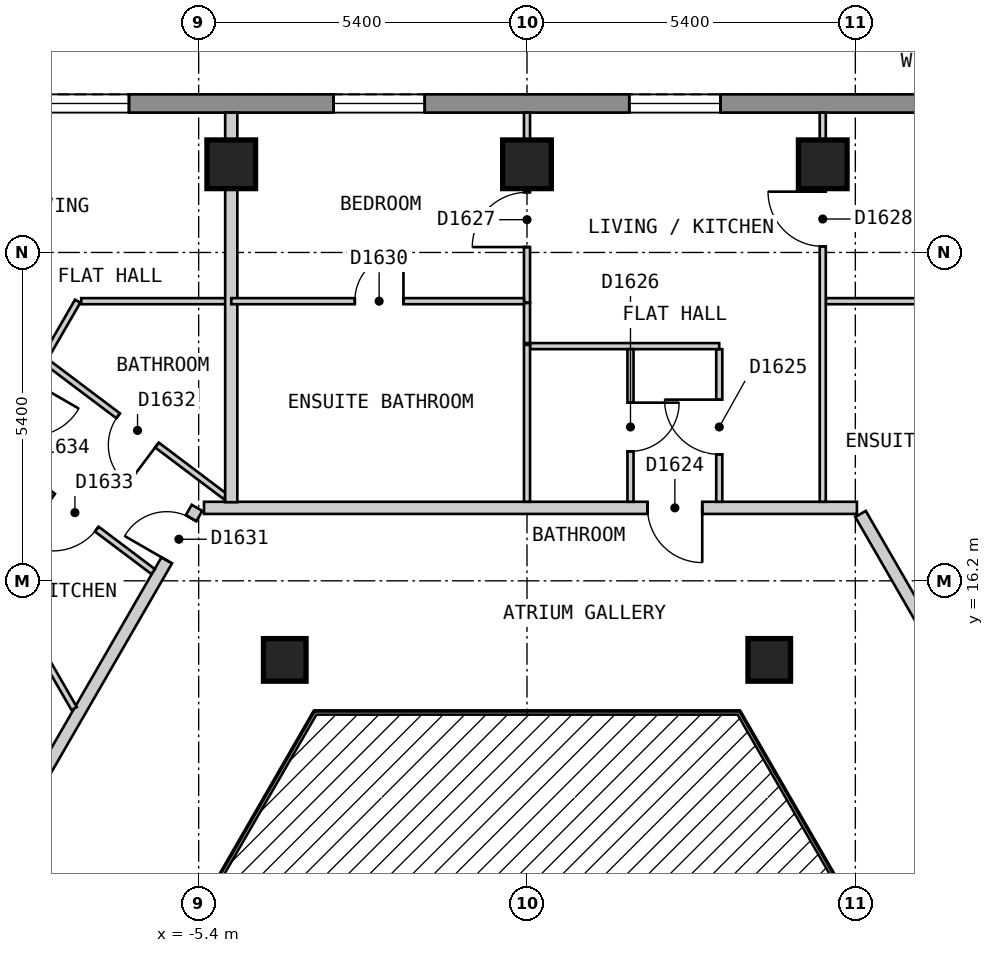
"""IFC4 building model, lengths in metres.
Left out: names, types, materials, properties, quantities, classifications, styles, units other than length and angle.
Written with IfcOpenShell. Run it as: python <this file> out.ifc"""

import sys

from ifc_helpers import new_model, si_unit, direction, frame, frame_2d, origin, origin_2d, place, context, subcontext, project, spatial, polyline, rectangle, outline, extrude, element, fill, save


model = new_model("IFC4")
c1 = context("Model", 3, precision=1e-05, world=origin(), true_north=direction((0.0, 1.0)))
c2 = subcontext(c1, "Body", "Model", "MODEL_VIEW")
j1 = project(units=[si_unit("LENGTHUNIT", "METRE"), si_unit("PLANEANGLEUNIT", "RADIAN")], contexts=[c1])
p1 = place(None, origin())
s1 = spatial("IfcSite", under=j1, at=p1, CompositionType="ELEMENT")
p2 = place(p1, origin())
s2 = spatial("IfcBuilding", under=s1, at=p2, CompositionType="ELEMENT")
p3 = place(p2, frame((0.0, 0.0, 163.2)))
s3 = spatial("IfcBuildingStorey", under=s2, at=p3, CompositionType="ELEMENT", Elevation=163.2)
for number, where, z_axis, x_axis in (
    (1, (4.864, 23.05, 0.0), (0.0, 0.0, 1.0), (-1.0, 0.0, 0.0)),
    (2, (0.0, 23.05, 0.0), (0.0, 0.0, 1.0), (-1.0, 0.0, 0.0)),
    (3, (-4.864, 23.05, 0.0), (0.0, 0.0, 1.0), (-1.0, 0.0, 0.0)),
):
    element("IfcColumn", number, at=place(p3, frame(where, z_axis=z_axis, x_axis=x_axis)), inside=s3, PredefinedType="COLUMN", context=c2, shape_type="SweptSolid", body=[
        extrude(rectangle(XDim=0.8, YDim=0.8, at=origin_2d()), origin(), (0.0, 0.0, 1.0), 3.0),
    ])
for number, where, z_axis, x_axis in (
    (4, (3.984, 14.9, 0.0), (0.0, 0.0, 1.0), (1.0, 0.0, 0.0)),
    (5, (-3.984, 14.9, 0.0), (0.0, 0.0, 1.0), (1.0, 0.0, 0.0)),
):
    element("IfcColumn", number, at=place(p3, frame(where, z_axis=z_axis, x_axis=x_axis)), inside=s3, PredefinedType="COLUMN", context=c2, shape_type="SweptSolid", body=[
        extrude(rectangle(XDim=0.7, YDim=0.7, at=origin_2d()), origin(), (0.0, 0.0, 1.0), 3.0),
    ])
p4 = place(p3, frame((10.392, 24.05, 0.0), z_axis=(0.0, 0.0, 1.0), x_axis=(-1.0, 0.0, 0.0)))
e6 = element("IfcWall", 6, at=p4, inside=s3, PredefinedType="SOLIDWALL", context=c2, shape_type="SweptSolid", body=[
    extrude(outline(polyline([(0.0, -0.15), (20.784, -0.15), (20.704, 0.15), (0.08, 0.15), (0.0, -0.15)])), origin(), (0.0, 0.0, 1.0), 2.7),
])
p5 = place(p4, frame((2.346, 0.0, 0.15)))
e7 = element("IfcOpeningElement", 7, at=p5, cuts=e6, PredefinedType="OPENING", context=c2, shape_type="SweptSolid", body=[
    extrude(rectangle(XDim=1.5, YDim=2.1, at=frame_2d((0.75, 1.05))), frame((0.0, 0.16, 0.0), z_axis=(0.0, -1.0, 0.0), x_axis=(1.0, 0.0, 0.0)), (0.0, 0.0, 1.0), 0.32),
])
p6 = place(p4, frame((7.21, 0.0, 0.15)))
e8 = element("IfcOpeningElement", 8, at=p6, cuts=e6, PredefinedType="OPENING", context=c2, shape_type="SweptSolid", body=[
    extrude(rectangle(XDim=1.5, YDim=2.1, at=frame_2d((0.75, 1.05))), frame((0.0, 0.16, 0.0), z_axis=(0.0, -1.0, 0.0), x_axis=(1.0, 0.0, 0.0)), (0.0, 0.0, 1.0), 0.32),
])
p7 = place(p4, frame((12.074, 0.0, 0.15)))
e9 = element("IfcOpeningElement", 9, at=p7, cuts=e6, PredefinedType="OPENING", context=c2, shape_type="SweptSolid", body=[
    extrude(rectangle(XDim=1.5, YDim=2.1, at=frame_2d((0.75, 1.05))), frame((0.0, 0.16, 0.0), z_axis=(0.0, -1.0, 0.0), x_axis=(1.0, 0.0, 0.0)), (0.0, 0.0, 1.0), 0.32),
])
p8 = place(p4, frame((16.938, 0.0, 0.15)))
e10 = element("IfcOpeningElement", 10, at=p8, cuts=e6, PredefinedType="OPENING", context=c2, shape_type="SweptSolid", body=[
    extrude(rectangle(XDim=1.5, YDim=2.1, at=frame_2d((0.75, 1.05))), frame((0.0, 0.16, 0.0), z_axis=(0.0, -1.0, 0.0), x_axis=(1.0, 0.0, 0.0)), (0.0, 0.0, 1.0), 0.32),
])
p9 = place(p3, frame((5.485, 17.3, 0.0), z_axis=(0.0, 0.0, 1.0), x_axis=(0.499965832213, -0.866045129667, 0.0)))
e11 = element("IfcWall", 11, at=p9, inside=s3, PredefinedType="PARTITIONING", context=c2, shape_type="SweptSolid", body=[
    extrude(rectangle(XDim=10.739, YDim=0.2, at=frame_2d((5.369, 0.0))), origin(), (0.0, 0.0, 1.0), 2.7),
])
p10 = place(p9, frame((9.047, 0.0, 0.0)))
e12 = element("IfcOpeningElement", 12, at=p10, cuts=e11, PredefinedType="OPENING", context=c2, shape_type="SweptSolid", body=[
    extrude(rectangle(XDim=1.0, YDim=2.1, at=frame_2d((0.5, 1.05))), frame((0.0, 0.11, 0.0), z_axis=(0.0, -1.0, 0.0), x_axis=(1.0, 0.0, 0.0)), (0.0, 0.0, 1.0), 0.22),
])
p11 = place(p3, frame((-5.312, 17.4, 0.0), z_axis=(0.0, 0.0, 1.0), x_axis=(1.0, 0.0, 0.0)))
e13 = element("IfcWall", 13, at=p11, inside=s3, PredefinedType="PARTITIONING", context=c2, shape_type="SweptSolid", body=[
    extrude(rectangle(XDim=10.738, YDim=0.2, at=frame_2d((5.369, 0.0))), origin(), (0.0, 0.0, 1.0), 2.7),
])
p12 = place(p11, frame((7.294, 0.0, 0.0)))
e14 = element("IfcOpeningElement", 14, at=p12, cuts=e13, PredefinedType="OPENING", context=c2, shape_type="SweptSolid", body=[
    extrude(rectangle(XDim=0.9, YDim=2.1, at=frame_2d((0.45, 1.05))), frame((0.0, 0.11, 0.0), z_axis=(0.0, -1.0, 0.0), x_axis=(1.0, 0.0, 0.0)), (0.0, 0.0, 1.0), 0.22),
])
p13 = place(p3, frame((-10.771, 8.144, 0.0), z_axis=(0.0, 0.0, 1.0), x_axis=(0.500008507724, 0.866020491792, 0.0)))
e15 = element("IfcWall", 15, at=p13, inside=s3, PredefinedType="PARTITIONING", context=c2, shape_type="SweptSolid", body=[
    extrude(rectangle(XDim=10.688, YDim=0.2, at=frame_2d((5.344, 0.0))), origin(), (0.0, 0.0, 1.0), 2.7),
])
p14 = place(p13, frame((9.692, 0.0, 0.0)))
e16 = element("IfcOpeningElement", 16, at=p14, cuts=e15, PredefinedType="OPENING", context=c2, shape_type="SweptSolid", body=[
    extrude(rectangle(XDim=0.8, YDim=2.1, at=frame_2d((0.4, 1.05))), frame((0.0, 0.11, 0.0), z_axis=(0.0, -1.0, 0.0), x_axis=(1.0, 0.0, 0.0)), (0.0, 0.0, 1.0), 0.22),
])
p15 = place(p13, frame((0.549, 0.0, 0.0)))
e17 = element("IfcOpeningElement", 17, at=p15, cuts=e15, PredefinedType="OPENING", context=c2, shape_type="SweptSolid", body=[
    extrude(rectangle(XDim=1.0, YDim=2.1, at=frame_2d((0.5, 1.05))), frame((0.0, 0.11, 0.0), z_axis=(0.0, -1.0, 0.0), x_axis=(1.0, 0.0, 0.0)), (0.0, 0.0, 1.0), 0.22),
])
p16 = place(p3, frame((0.0, 20.769, 0.0), z_axis=(0.0, 0.0, 1.0), x_axis=(0.0, -1.0, 0.0)))
e18 = element("IfcWall", 18, at=p16, inside=s3, PredefinedType="PARTITIONING", context=c2, shape_type="SweptSolid", body=[
    extrude(rectangle(XDim=0.659, YDim=0.1, at=frame_2d((0.33, 0.0))), origin(), (0.0, 0.0, 1.0), 2.7),
])
p17 = place(p3, frame((3.162, 20.009, 0.0), z_axis=(0.0, 0.0, 1.0), x_axis=(0.0, -1.0, 0.0)))
e19 = element("IfcWall", 19, at=p17, inside=s3, PredefinedType="PARTITIONING", context=c2, shape_type="SweptSolid", body=[
    extrude(rectangle(XDim=2.509, YDim=0.1, at=frame_2d((1.254, 0.0))), origin(), (0.0, 0.0, 1.0), 2.7),
])
p18 = place(p17, frame((0.829, 0.0, 0.0)))
e20 = element("IfcOpeningElement", 20, at=p18, cuts=e19, PredefinedType="OPENING", context=c2, shape_type="SweptSolid", body=[
    extrude(rectangle(XDim=0.9, YDim=2.1, at=frame_2d((0.45, 1.05))), frame((0.0, 0.06, 0.0), z_axis=(0.0, -1.0, 0.0), x_axis=(1.0, 0.0, 0.0)), (0.0, 0.0, 1.0), 0.12),
])
p19 = place(p3, frame((-8.763, 18.321, 0.0), z_axis=(0.0, 0.0, 1.0), x_axis=(0.798861914713, -0.601514456369, 0.0)))
e21 = element("IfcWall", 21, at=p19, inside=s3, PredefinedType="PARTITIONING", context=c2, shape_type="SweptSolid", body=[
    extrude(rectangle(XDim=3.273, YDim=0.1, at=frame_2d((1.637, 0.0))), origin(), (0.0, 0.0, 1.0), 2.7),
])
p20 = place(p19, frame((1.212, 0.0, 0.0)))
e22 = element("IfcOpeningElement", 22, at=p20, cuts=e21, PredefinedType="OPENING", context=c2, shape_type="SweptSolid", body=[
    extrude(rectangle(XDim=0.9, YDim=2.1, at=frame_2d((0.45, 1.05))), frame((0.0, 0.06, 0.0), z_axis=(0.0, -1.0, 0.0), x_axis=(1.0, 0.0, 0.0)), (0.0, 0.0, 1.0), 0.12),
])
p21 = place(p3, frame((-7.906, 19.804, 0.0), z_axis=(0.0, 0.0, 1.0), x_axis=(0.798741470056, -0.60167438371, 0.0)))
e23 = element("IfcWall", 23, at=p21, inside=s3, PredefinedType="PARTITIONING", context=c2, shape_type="SweptSolid", body=[
    extrude(rectangle(XDim=3.683, YDim=0.1, at=frame_2d((1.842, 0.0))), origin(), (0.0, 0.0, 1.0), 2.7),
])
p22 = place(p21, frame((1.479, 0.0, 0.0)))
e24 = element("IfcOpeningElement", 24, at=p22, cuts=e23, PredefinedType="OPENING", context=c2, shape_type="SweptSolid", body=[
    extrude(rectangle(XDim=0.8, YDim=2.1, at=frame_2d((0.4, 1.05))), frame((0.0, 0.06, 0.0), z_axis=(0.0, -1.0, 0.0), x_axis=(1.0, 0.0, 0.0)), (0.0, 0.0, 1.0), 0.12),
])
p23 = place(p3, frame((0.05, 20.06, 0.0), z_axis=(0.0, 0.0, 1.0), x_axis=(1.0, 0.0, 0.0)))
e25 = element("IfcWall", 25, at=p23, inside=s3, PredefinedType="PARTITIONING", context=c2, shape_type="SweptSolid", body=[
    extrude(rectangle(XDim=3.111, YDim=0.1, at=frame_2d((1.555, 0.0))), origin(), (0.0, 0.0, 1.0), 2.7),
])
p24 = place(p3, frame((-7.332, 20.799, 0.0), z_axis=(0.0, 0.0, 1.0), x_axis=(1.0, 0.0, 0.0)))
e26 = element("IfcWall", 26, at=p24, inside=s3, PredefinedType="PARTITIONING", context=c2, shape_type="SweptSolid", body=[
    extrude(rectangle(XDim=2.468, YDim=0.1, at=frame_2d((1.234, 0.0))), origin(), (0.0, 0.0, 1.0), 2.7),
])
p25 = place(p3, frame((4.914, 20.799, 0.0), z_axis=(0.0, 0.0, 1.0), x_axis=(1.0, 0.0, 0.0)))
e27 = element("IfcWall", 27, at=p25, inside=s3, PredefinedType="PARTITIONING", context=c2, shape_type="SweptSolid", body=[
    extrude(rectangle(XDim=2.475, YDim=0.1, at=frame_2d((1.237, 0.0))), origin(), (0.0, 0.0, 1.0), 2.7),
])
p26 = place(p3, frame((-11.806, 13.149, 0.0), z_axis=(0.0, 0.0, 1.0), x_axis=(0.499932199895, 0.866064544655, 0.0)))
e28 = element("IfcWall", 28, at=p26, inside=s3, PredefinedType="PARTITIONING", context=c2, shape_type="SweptSolid", body=[
    extrude(rectangle(XDim=8.833, YDim=0.1, at=frame_2d((4.417, 0.0))), origin(), (0.0, 0.0, 1.0), 2.7),
])
p27 = place(p26, frame((6.413, 0.0, 0.0)))
e29 = element("IfcOpeningElement", 29, at=p27, cuts=e28, PredefinedType="OPENING", context=c2, shape_type="SweptSolid", body=[
    extrude(rectangle(XDim=0.9, YDim=2.1, at=frame_2d((0.45, 1.05))), frame((0.0, 0.06, 0.0), z_axis=(0.0, -1.0, 0.0), x_axis=(1.0, 0.0, 0.0)), (0.0, 0.0, 1.0), 0.12),
])
p28 = place(p26, frame((2.004, 0.0, 0.0)))
e30 = element("IfcOpeningElement", 30, at=p28, cuts=e28, PredefinedType="OPENING", context=c2, shape_type="SweptSolid", body=[
    extrude(rectangle(XDim=0.8, YDim=2.1, at=frame_2d((0.4, 1.05))), frame((0.0, 0.06, 0.0), z_axis=(0.0, -1.0, 0.0), x_axis=(1.0, 0.0, 0.0)), (0.0, 0.0, 1.0), 0.12),
])
p29 = place(p3, frame((4.864, 17.5, 0.0), z_axis=(0.0, 0.0, 1.0), x_axis=(0.0, 1.0, 0.0)))
e31 = element("IfcWall", 31, at=p29, inside=s3, PredefinedType="PARTITIONING", context=c2, shape_type="SweptSolid", body=[
    extrude(rectangle(XDim=6.4, YDim=0.1, at=frame_2d((3.2, 0.0))), origin(), (0.0, 0.0, 1.0), 2.7),
])
p30 = place(p29, frame((4.2, 0.0, 0.0)))
e32 = element("IfcOpeningElement", 32, at=p30, cuts=e31, PredefinedType="OPENING", context=c2, shape_type="SweptSolid", body=[
    extrude(rectangle(XDim=0.9, YDim=2.1, at=frame_2d((0.45, 1.05))), frame((0.0, 0.06, 0.0), z_axis=(0.0, -1.0, 0.0), x_axis=(1.0, 0.0, 0.0)), (0.0, 0.0, 1.0), 0.12),
])
p31 = place(p3, frame((1.702, 17.5, 0.0), z_axis=(0.0, 0.0, 1.0), x_axis=(0.0, 1.0, 0.0)))
e33 = element("IfcWall", 33, at=p31, inside=s3, PredefinedType="PARTITIONING", context=c2, shape_type="SweptSolid", body=[
    extrude(rectangle(XDim=2.51, YDim=0.1, at=frame_2d((1.255, 0.0))), origin(), (0.0, 0.0, 1.0), 2.7),
])
p32 = place(p31, frame((0.83, 0.0, 0.0)))
e34 = element("IfcOpeningElement", 34, at=p32, cuts=e33, PredefinedType="OPENING", context=c2, shape_type="SweptSolid", body=[
    extrude(rectangle(XDim=0.8, YDim=2.1, at=frame_2d((0.4, 1.05))), frame((0.0, 0.06, 0.0), z_axis=(0.0, -1.0, 0.0), x_axis=(1.0, 0.0, 0.0)), (0.0, 0.0, 1.0), 0.12),
])
p33 = place(p3, frame((0.0, 17.5, 0.0), z_axis=(0.0, 0.0, 1.0), x_axis=(0.0, 1.0, 0.0)))
e35 = element("IfcWall", 35, at=p33, inside=s3, PredefinedType="PARTITIONING", context=c2, shape_type="SweptSolid", body=[
    extrude(rectangle(XDim=2.58, YDim=0.1, at=frame_2d((1.29, 0.0))), origin(), (0.0, 0.0, 1.0), 2.7),
])
p34 = place(p3, frame((0.0, 20.779, 0.0), z_axis=(0.0, 0.0, 1.0), x_axis=(0.0, 1.0, 0.0)))
e36 = element("IfcWall", 36, at=p34, inside=s3, PredefinedType="PARTITIONING", context=c2, shape_type="SweptSolid", body=[
    extrude(rectangle(XDim=3.121, YDim=0.1, at=frame_2d((1.561, 0.0))), origin(), (0.0, 0.0, 1.0), 2.7),
])
p35 = place(p34, frame((0.91, 0.0, 0.0)))
e37 = element("IfcOpeningElement", 37, at=p35, cuts=e36, PredefinedType="OPENING", context=c2, shape_type="SweptSolid", body=[
    extrude(rectangle(XDim=0.9, YDim=2.1, at=frame_2d((0.45, 1.05))), frame((0.0, 0.06, 0.0), z_axis=(0.0, -1.0, 0.0), x_axis=(1.0, 0.0, 0.0)), (0.0, 0.0, 1.0), 0.12),
])
p36 = place(p3, frame((-4.864, 17.493, 0.0), z_axis=(0.0, 0.0, 1.0), x_axis=(0.0, 1.0, 0.0)))
e38 = element("IfcWall", 38, at=p36, inside=s3, PredefinedType="PARTITIONING", context=c2, shape_type="SweptSolid", body=[
    extrude(rectangle(XDim=6.407, YDim=0.2, at=frame_2d((3.204, 0.0))), origin(), (0.0, 0.0, 1.0), 2.7),
])
p37 = place(p3, frame((-9.352, 17.4, 0.0), z_axis=(0.0, 0.0, 1.0), x_axis=(0.499785326313, -0.866149310225, 0.0)))
e39 = element("IfcWall", 39, at=p37, inside=s3, PredefinedType="PARTITIONING", context=c2, shape_type="SweptSolid", body=[
    extrude(rectangle(XDim=3.81, YDim=0.1, at=frame_2d((1.905, 0.0))), origin(), (0.0, 0.0, 1.0), 2.7),
])
p38 = place(p3, frame((-4.864, 20.799, 0.0), z_axis=(0.0, 0.0, 1.0), x_axis=(1.0, 0.0, 0.0)))
e40 = element("IfcWall", 40, at=p38, inside=s3, PredefinedType="PARTITIONING", context=c2, shape_type="SweptSolid", body=[
    extrude(rectangle(XDim=4.814, YDim=0.1, at=frame_2d((2.407, 0.0))), origin(), (0.0, 0.0, 1.0), 2.7),
])
p39 = place(p38, frame((2.032, 0.0, 0.0)))
e41 = element("IfcOpeningElement", 41, at=p39, cuts=e40, PredefinedType="OPENING", context=c2, shape_type="SweptSolid", body=[
    extrude(rectangle(XDim=0.8, YDim=2.1, at=frame_2d((0.4, 1.05))), frame((0.0, 0.06, 0.0), z_axis=(0.0, -1.0, 0.0), x_axis=(1.0, 0.0, 0.0)), (0.0, 0.0, 1.0), 0.12),
])
p40 = place(p6, origin())
e42 = element("IfcWindow", 42, at=p40, inside=s3, PartitioningType="SINGLE_PANEL", PredefinedType="WINDOW", context=c2, shape_type="SweptSolid", body=[
    extrude(rectangle(XDim=1.5, YDim=2.1, at=frame_2d((0.75, 1.05))), frame((0.0, 0.03, 0.0), z_axis=(0.0, -1.0, 0.0), x_axis=(1.0, 0.0, 0.0)), (0.0, 0.0, 1.0), 0.06),
])
fill(e8, e42)
p41 = place(p7, origin())
e43 = element("IfcWindow", 43, at=p41, inside=s3, PartitioningType="SINGLE_PANEL", PredefinedType="WINDOW", context=c2, shape_type="SweptSolid", body=[
    extrude(rectangle(XDim=1.5, YDim=2.1, at=frame_2d((0.75, 1.05))), frame((0.0, 0.03, 0.0), z_axis=(0.0, -1.0, 0.0), x_axis=(1.0, 0.0, 0.0)), (0.0, 0.0, 1.0), 0.06),
])
fill(e9, e43)
p42 = place(p8, origin())
e44 = element("IfcWindow", 44, at=p42, inside=s3, PartitioningType="SINGLE_PANEL", PredefinedType="WINDOW", context=c2, shape_type="SweptSolid", body=[
    extrude(rectangle(XDim=1.5, YDim=2.1, at=frame_2d((0.75, 1.05))), frame((0.0, 0.03, 0.0), z_axis=(0.0, -1.0, 0.0), x_axis=(1.0, 0.0, 0.0)), (0.0, 0.0, 1.0), 0.06),
])
fill(e10, e44)
p43 = place(p12, origin())
e45 = element("IfcDoor", 45, at=p43, inside=s3, OperationType="SINGLE_SWING_RIGHT", PredefinedType="DOOR", context=c2, shape_type="SweptSolid", body=[
    extrude(rectangle(XDim=0.9, YDim=2.1, at=frame_2d((0.45, 1.05))), frame((0.0, 0.025, 0.0), z_axis=(0.0, -1.0, 0.0), x_axis=(1.0, 0.0, 0.0)), (0.0, 0.0, 1.0), 0.05),
])
fill(e14, e45)
p44 = place(p18, origin())
e46 = element("IfcDoor", 46, at=p44, inside=s3, OperationType="SINGLE_SWING_LEFT", PredefinedType="DOOR", context=c2, shape_type="SweptSolid", body=[
    extrude(rectangle(XDim=0.9, YDim=2.1, at=frame_2d((0.45, 1.05))), frame((0.0, 0.025, 0.0), z_axis=(0.0, -1.0, 0.0), x_axis=(1.0, 0.0, 0.0)), (0.0, 0.0, 1.0), 0.05),
])
fill(e20, e46)
p45 = place(p32, origin())
e47 = element("IfcDoor", 47, at=p45, inside=s3, OperationType="SINGLE_SWING_RIGHT", PredefinedType="DOOR", context=c2, shape_type="SweptSolid", body=[
    extrude(rectangle(XDim=0.8, YDim=2.1, at=frame_2d((0.4, 1.05))), frame((0.0, 0.025, 0.0), z_axis=(0.0, -1.0, 0.0), x_axis=(1.0, 0.0, 0.0)), (0.0, 0.0, 1.0), 0.05),
])
fill(e34, e47)
p46 = place(p35, origin())
e48 = element("IfcDoor", 48, at=p46, inside=s3, OperationType="SINGLE_SWING_LEFT", PredefinedType="DOOR", context=c2, shape_type="SweptSolid", body=[
    extrude(rectangle(XDim=0.9, YDim=2.1, at=frame_2d((0.45, 1.05))), frame((0.0, 0.025, 0.0), z_axis=(0.0, -1.0, 0.0), x_axis=(1.0, 0.0, 0.0)), (0.0, 0.0, 1.0), 0.05),
])
fill(e37, e48)
p47 = place(p30, origin())
e49 = element("IfcDoor", 49, at=p47, inside=s3, OperationType="SINGLE_SWING_RIGHT", PredefinedType="DOOR", context=c2, shape_type="SweptSolid", body=[
    extrude(rectangle(XDim=0.9, YDim=2.1, at=frame_2d((0.45, 1.05))), frame((0.0, 0.025, 0.0), z_axis=(0.0, -1.0, 0.0), x_axis=(1.0, 0.0, 0.0)), (0.0, 0.0, 1.0), 0.05),
])
fill(e32, e49)
p48 = place(p39, origin())
e50 = element("IfcDoor", 50, at=p48, inside=s3, OperationType="SINGLE_SWING_RIGHT", PredefinedType="DOOR", context=c2, shape_type="SweptSolid", body=[
    extrude(rectangle(XDim=0.8, YDim=2.1, at=frame_2d((0.4, 1.05))), frame((0.0, 0.025, 0.0), z_axis=(0.0, -1.0, 0.0), x_axis=(1.0, 0.0, 0.0)), (0.0, 0.0, 1.0), 0.05),
])
fill(e41, e50)
p49 = place(p14, origin())
e51 = element("IfcDoor", 51, at=p49, inside=s3, OperationType="SINGLE_SWING_LEFT", PredefinedType="DOOR", context=c2, shape_type="SweptSolid", body=[
    extrude(rectangle(XDim=0.8, YDim=2.1, at=frame_2d((0.4, 1.05))), frame((0.0, 0.025, 0.0), z_axis=(0.0, -1.0, 0.0), x_axis=(1.0, 0.0, 0.0)), (0.0, 0.0, 1.0), 0.05),
])
fill(e16, e51)
p50 = place(p22, origin())
e52 = element("IfcDoor", 52, at=p50, inside=s3, OperationType="SINGLE_SWING_RIGHT", PredefinedType="DOOR", context=c2, shape_type="SweptSolid", body=[
    extrude(rectangle(XDim=0.8, YDim=2.1, at=frame_2d((0.4, 1.05))), frame((0.0, 0.025, 0.0), z_axis=(0.0, -1.0, 0.0), x_axis=(1.0, 0.0, 0.0)), (0.0, 0.0, 1.0), 0.05),
])
fill(e24, e52)
p51 = place(p20, origin())
e53 = element("IfcDoor", 53, at=p51, inside=s3, OperationType="SINGLE_SWING_LEFT", PredefinedType="DOOR", context=c2, shape_type="SweptSolid", body=[
    extrude(rectangle(XDim=0.9, YDim=2.1, at=frame_2d((0.45, 1.05))), frame((0.0, 0.025, 0.0), z_axis=(0.0, -1.0, 0.0), x_axis=(1.0, 0.0, 0.0)), (0.0, 0.0, 1.0), 0.05),
])
fill(e22, e53)
save(model, sys.argv[1])
